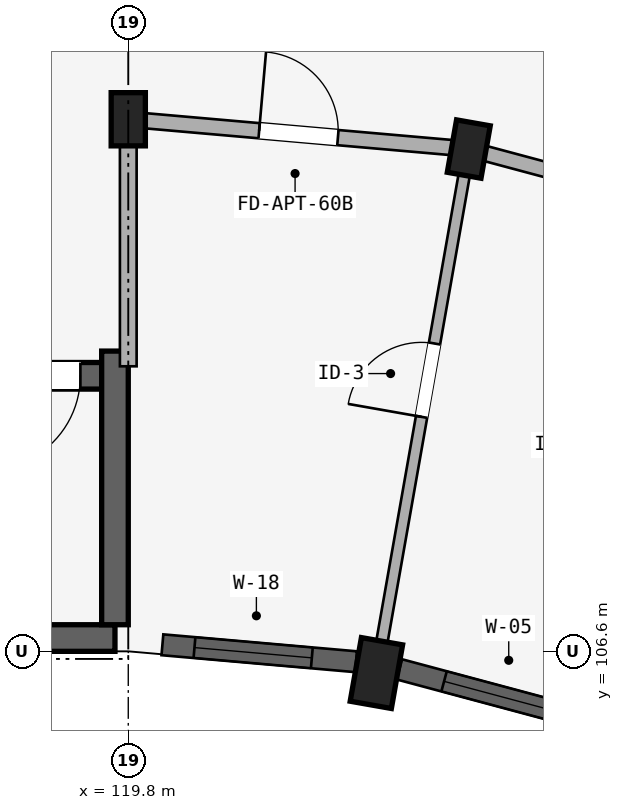
"""IFC4 building model, lengths in metres.
Left out: names, types, materials, properties, quantities, classifications, styles, units other than length and angle.
Written with IfcOpenShell. Run it as: python <this file> out.ifc"""

import sys

from ifc_helpers import new_model, si_unit, direction, frame, frame_2d, origin, origin_2d, place, context, subcontext, project, spatial, rectangle, extrude, element, fill, save


model = new_model("IFC4")
c1 = context("Model", 3, precision=1e-05, world=origin(), true_north=direction((0.0, 1.0)))
c2 = subcontext(c1, "Body", "Model", "MODEL_VIEW")
j1 = project(units=[si_unit("LENGTHUNIT", "METRE"), si_unit("PLANEANGLEUNIT", "RADIAN")], contexts=[c1])
p1 = place(None, origin())
s1 = spatial("IfcSite", under=j1, at=p1, CompositionType="ELEMENT")
p2 = place(p1, origin())
s2 = spatial("IfcBuilding", under=s1, at=p2, CompositionType="ELEMENT")
p3 = place(p2, frame((0.0, 0.0, 11.85)))
s3 = spatial("IfcBuildingStorey", under=s2, at=p3, CompositionType="ELEMENT", Elevation=11.85)
p4 = place(p3, frame((119.625, 106.775, 0.0), z_axis=(0.0, 0.0, 1.0), x_axis=(-1.0, 0.0, 0.0)))
e1 = element("IfcWall", 1, at=p4, inside=s3, PredefinedType="SHEAR", context=c2, shape_type="SweptSolid", body=[
    extrude(rectangle(XDim=8.25, YDim=0.35, at=frame_2d((4.125, 0.0))), origin(), (0.0, 0.0, 1.0), 2.93),
])
p5 = place(p3, frame((119.45, 110.225, 0.0), z_axis=(0.0, 0.0, 1.0), x_axis=(-1.0, 0.0, 0.0)))
e2 = element("IfcWall", 2, at=p5, inside=s3, PredefinedType="SHEAR", context=c2, shape_type="SweptSolid", body=[
    extrude(rectangle(XDim=7.9, YDim=0.35, at=frame_2d((3.95, 0.0))), origin(), (0.0, 0.0, 1.0), 2.93),
])
p6 = place(p5, frame((0.28, 0.0, 0.0)))
e3 = element("IfcOpeningElement", 3, at=p6, cuts=e2, PredefinedType="OPENING", context=c2, shape_type="SweptSolid", body=[
    extrude(rectangle(XDim=1.24, YDim=2.15, at=frame_2d((0.62, 1.075))), frame((0.0, 0.185, 0.0), z_axis=(0.0, -1.0, 0.0), x_axis=(1.0, 0.0, 0.0)), (0.0, 0.0, 1.0), 0.37),
])
p7 = place(p3, frame((119.625, 106.95, 0.0), z_axis=(0.0, 0.0, 1.0), x_axis=(0.0, 1.0, 0.0)))
e4 = element("IfcWall", 4, at=p7, inside=s3, PredefinedType="SHEAR", context=c2, shape_type="SweptSolid", body=[
    extrude(rectangle(XDim=3.6, YDim=0.35, at=frame_2d((1.8, 0.0))), origin(), (0.0, 0.0, 1.0), 2.93),
])
p8 = place(p3, frame((119.8, 113.6, 0.0), z_axis=(0.0, 0.0, 1.0), x_axis=(1.0, 0.0, 0.0)))
e5 = element("IfcColumn", 5, at=p8, inside=s3, PredefinedType="COLUMN", context=c2, shape_type="SweptSolid", body=[
    extrude(rectangle(XDim=0.45, YDim=0.7, at=origin_2d()), origin(), (0.0, 0.0, 1.0), 2.93),
])
p9 = place(p3, frame((123.065, 106.314, 0.0), z_axis=(0.0, 0.0, 1.0), x_axis=(-0.984807753012, 0.173648177667, 0.0)))
e6 = element("IfcColumn", 6, at=p9, inside=s3, PredefinedType="COLUMN", context=c2, shape_type="SweptSolid", body=[
    extrude(rectangle(XDim=0.55, YDim=0.85, at=origin_2d()), origin(), (0.0, 0.0, 1.0), 2.93),
])
p10 = place(p3, frame((124.28, 113.208, 0.0), z_axis=(0.0, 0.0, 1.0), x_axis=(-0.984807753012, 0.173648177667, 0.0)))
e7 = element("IfcColumn", 7, at=p10, inside=s3, PredefinedType="COLUMN", context=c2, shape_type="SweptSolid", body=[
    extrude(rectangle(XDim=0.45, YDim=0.7, at=origin_2d()), origin(), (0.0, 0.0, 1.0), 2.93),
])
p11 = place(p3, frame((119.8, 113.6, 0.0), z_axis=(0.0, 0.0, 1.0), x_axis=(0.996191949488, -0.087187153726, 0.0)))
e8 = element("IfcWall", 8, at=p11, inside=s3, PredefinedType="STANDARD", context=c2, shape_type="SweptSolid", body=[
    extrude(rectangle(XDim=4.497, YDim=0.2, at=frame_2d((2.249, 0.0))), origin(), (0.0, 0.0, 1.0), 2.372),
])
p12 = place(p11, frame((1.729, 0.0, 0.0)))
e9 = element("IfcOpeningElement", 9, at=p12, cuts=e8, PredefinedType="OPENING", context=c2, shape_type="SweptSolid", body=[
    extrude(rectangle(XDim=1.04, YDim=2.15, at=frame_2d((0.52, 1.075))), frame((0.0, 0.11, 0.0), z_axis=(0.0, -1.0, 0.0), x_axis=(1.0, 0.0, 0.0)), (0.0, 0.0, 1.0), 0.22),
])
p13 = place(p3, frame((124.28, 113.208, 0.0), z_axis=(0.0, 0.0, 1.0), x_axis=(0.965934240054, -0.258787642463, 0.0)))
e10 = element("IfcWall", 10, at=p13, inside=s3, PredefinedType="STANDARD", context=c2, shape_type="SweptSolid", body=[
    extrude(rectangle(XDim=4.497, YDim=0.2, at=frame_2d((2.249, 0.0))), origin(), (0.0, 0.0, 1.0), 2.372),
])
p14 = place(p3, frame((124.697, 115.572, 0.0), z_axis=(0.0, 0.0, 1.0), x_axis=(0.965930095386, -0.258803112091, 0.0)))
e11 = element("IfcWall", 11, at=p14, inside=s3, PredefinedType="STANDARD", context=c2, shape_type="SweptSolid", body=[
    extrude(rectangle(XDim=4.916, YDim=0.2, at=frame_2d((2.458, 0.0))), origin(), (0.0, 0.0, 1.0), 2.372),
])
p15 = place(p3, frame((119.8, 110.35, 0.0), z_axis=(0.0, 0.0, 1.0), x_axis=(0.0, 1.0, 0.0)))
e12 = element("IfcWall", 12, at=p15, inside=s3, PredefinedType="STANDARD", context=c2, shape_type="SweptSolid", body=[
    extrude(rectangle(XDim=3.2, YDim=0.22, at=frame_2d((1.6, 0.0))), origin(), (0.0, 0.0, 1.0), 2.372),
])
p16 = place(p3, frame((123.099, 106.511, 0.0), z_axis=(0.0, 0.0, 1.0), x_axis=(0.173647089161, 0.984807944945, 0.0)))
e13 = element("IfcWall", 13, at=p16, inside=s3, PredefinedType="PARTITIONING", context=c2, shape_type="SweptSolid", body=[
    extrude(rectangle(XDim=6.75, YDim=0.15, at=frame_2d((3.375, 0.0))), origin(), (0.0, 0.0, 1.0), 2.372),
])
p17 = place(p16, frame((3.222, 0.0, 0.0)))
e14 = element("IfcOpeningElement", 14, at=p17, cuts=e13, PredefinedType="OPENING", context=c2, shape_type="SweptSolid", body=[
    extrude(rectangle(XDim=0.98, YDim=2.12, at=frame_2d((0.49, 1.06))), frame((0.0, 0.085, 0.0), z_axis=(0.0, -1.0, 0.0), x_axis=(1.0, 0.0, 0.0)), (0.0, 0.0, 1.0), 0.17),
])
p18 = place(p3, frame((120.249, 106.686, 0.0), z_axis=(0.0, 0.0, 1.0), x_axis=(0.996194235595, -0.08716102895, 0.0)))
e15 = element("IfcWall", 15, at=p18, inside=s3, PredefinedType="STANDARD", context=c2, shape_type="SweptSolid", body=[
    extrude(rectangle(XDim=2.557, YDim=0.275, at=frame_2d((1.279, 0.0))), origin(), (0.0, 0.0, 1.0), 2.422),
])
p19 = place(p18, frame((0.424, 0.0, 0.622)))
e16 = element("IfcOpeningElement", 16, at=p19, cuts=e15, PredefinedType="OPENING", context=c2, shape_type="SweptSolid", body=[
    extrude(rectangle(XDim=1.55, YDim=1.6, at=frame_2d((0.775, 0.8))), frame((0.0, 0.147, 0.0), z_axis=(0.0, -1.0, 0.0), x_axis=(1.0, 0.0, 0.0)), (0.0, 0.0, 1.0), 0.295),
])
p20 = place(p3, frame((123.367, 106.363, 0.0), z_axis=(0.0, 0.0, 1.0), x_axis=(0.965925595341, -0.258819907011, 0.0)))
e17 = element("IfcWall", 17, at=p20, inside=s3, PredefinedType="STANDARD", context=c2, shape_type="SweptSolid", body=[
    extrude(rectangle(XDim=2.718, YDim=0.275, at=frame_2d((1.359, 0.0))), origin(), (0.0, 0.0, 1.0), 2.422),
])
p21 = place(p20, frame((0.609, 0.0, 0.572)))
e18 = element("IfcOpeningElement", 18, at=p21, cuts=e17, PredefinedType="OPENING", context=c2, shape_type="SweptSolid", body=[
    extrude(rectangle(XDim=1.5, YDim=1.65, at=frame_2d((0.75, 0.825))), frame((0.0, 0.147, 0.0), z_axis=(0.0, -1.0, 0.0), x_axis=(1.0, 0.0, 0.0)), (0.0, 0.0, 1.0), 0.295),
])
p22 = place(p19, origin())
e19 = element("IfcWindow", 19, at=p22, inside=s3, PartitioningType="DOUBLE_PANEL_VERTICAL", PredefinedType="WINDOW", context=c2, shape_type="SweptSolid", body=[
    extrude(rectangle(XDim=1.55, YDim=1.6, at=frame_2d((0.775, 0.8))), frame((0.0, 0.03, 0.0), z_axis=(0.0, -1.0, 0.0), x_axis=(1.0, 0.0, 0.0)), (0.0, 0.0, 1.0), 0.06),
])
fill(e16, e19)
p23 = place(p21, origin())
e20 = element("IfcWindow", 20, at=p23, inside=s3, PartitioningType="DOUBLE_PANEL_VERTICAL", PredefinedType="WINDOW", context=c2, shape_type="SweptSolid", body=[
    extrude(rectangle(XDim=1.5, YDim=1.65, at=frame_2d((0.75, 0.825))), frame((0.0, 0.03, 0.0), z_axis=(0.0, -1.0, 0.0), x_axis=(1.0, 0.0, 0.0)), (0.0, 0.0, 1.0), 0.06),
])
fill(e18, e20)
p24 = place(p6, origin())
e21 = element("IfcDoor", 21, at=p24, inside=s3, OperationType="SINGLE_SWING_RIGHT", PredefinedType="DOOR", context=c2, shape_type="SweptSolid", body=[
    extrude(rectangle(XDim=1.24, YDim=2.15, at=frame_2d((0.62, 1.075))), frame((0.0, 0.025, 0.0), z_axis=(0.0, -1.0, 0.0), x_axis=(1.0, 0.0, 0.0)), (0.0, 0.0, 1.0), 0.05),
])
fill(e3, e21)
p25 = place(p17, frame((0.98, 0.0, 0.0), z_axis=(0.0, 0.0, 1.0), x_axis=(-1.0, 0.0, 0.0)))
e22 = element("IfcDoor", 22, at=p25, inside=s3, OperationType="SINGLE_SWING_RIGHT", PredefinedType="DOOR", context=c2, shape_type="SweptSolid", body=[
    extrude(rectangle(XDim=0.98, YDim=2.12, at=frame_2d((0.49, 1.06))), frame((0.0, 0.025, 0.0), z_axis=(0.0, -1.0, 0.0), x_axis=(1.0, 0.0, 0.0)), (0.0, 0.0, 1.0), 0.05),
])
fill(e14, e22)
p26 = place(p12, origin())
e23 = element("IfcDoor", 23, at=p26, inside=s3, OperationType="SINGLE_SWING_LEFT", PredefinedType="DOOR", context=c2, shape_type="SweptSolid", body=[
    extrude(rectangle(XDim=1.04, YDim=2.15, at=frame_2d((0.52, 1.075))), frame((0.0, 0.025, 0.0), z_axis=(0.0, -1.0, 0.0), x_axis=(1.0, 0.0, 0.0)), (0.0, 0.0, 1.0), 0.05),
])
fill(e9, e23)
save(model, sys.argv[1])
